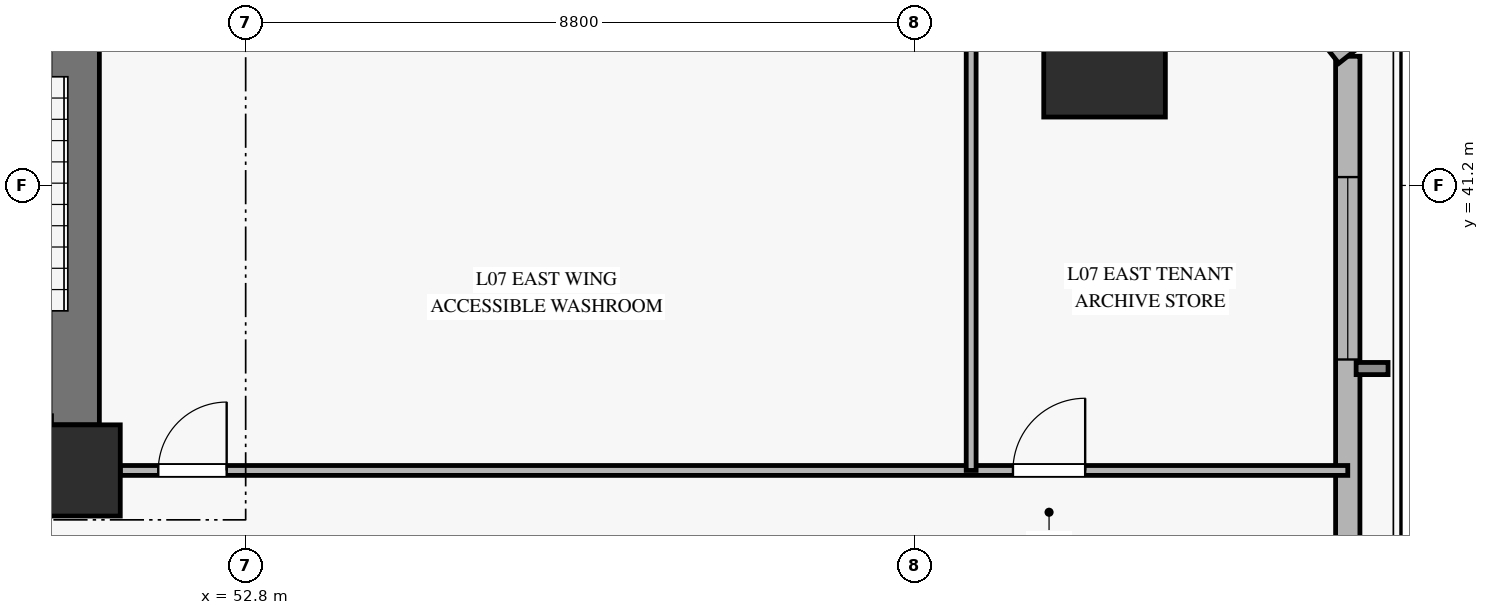
"""IFC4 building model, lengths in metres.
Left out: names, types, materials, properties, quantities, classifications, styles, units other than length and angle.
Written with IfcOpenShell. Run it as: python <this file> out.ifc"""

import sys

from ifc_helpers import new_model, si_unit, direction, frame, frame_2d, origin, origin_2d, place, context, subcontext, project, spatial, rectangle, hollow_rectangle, extrude, source, transform, mapped, element, fill, save


model = new_model("IFC4")
c1 = context("Model", 3, precision=1e-05, world=origin(), true_north=direction((0.0, 1.0)))
c2 = subcontext(c1, "Body", "Model", "MODEL_VIEW")
j1 = project(units=[si_unit("LENGTHUNIT", "METRE"), si_unit("PLANEANGLEUNIT", "RADIAN")], contexts=[c1])
p1 = place(None, origin())
s1 = spatial("IfcSite", under=j1, at=p1, CompositionType="ELEMENT")
p2 = place(p1, origin())
s2 = spatial("IfcBuilding", under=s1, at=p2, CompositionType="ELEMENT")
p3 = place(p2, frame((0.0, 0.0, 29.3)))
s3 = spatial("IfcBuildingStorey", under=s2, at=p3, CompositionType="ELEMENT", Elevation=29.3)
m1 = source(origin(), c2, "Body", "SweptSolid", [
    extrude(rectangle(XDim=1.2, YDim=1.2, at=origin_2d()), origin(), (0.0, 0.0, 1.0), 3.68),
])
p4 = place(p3, frame((50.55, 37.45, 0.0), z_axis=(0.0, 0.0, 1.0), x_axis=(1.0, 0.0, 0.0)))
e1 = element("IfcColumn", 1, at=p4, inside=s3, PredefinedType="PILASTER", context=c2, shape_type="MappedRepresentation", body=[
    mapped(m1, transform((0.0, 0.0, 0.0), x_axis=(1.0, 0.0, 0.0), y_axis=(0.0, 1.0, 0.0), z_axis=(0.0, 0.0, 1.0), scale=1.0)),
])
p5 = place(p3, frame((50.55, 38.05, 0.0), z_axis=(0.0, 0.0, 1.0), x_axis=(0.0, 1.0, 0.0)))
e2 = element("IfcWall", 2, at=p5, inside=s3, PredefinedType="SHEAR", context=c2, shape_type="SweptSolid", body=[
    extrude(rectangle(XDim=7.9, YDim=0.65, at=frame_2d((3.95, 0.0))), origin(), (0.0, 0.0, 1.0), 3.68),
])
m2 = source(origin(), c2, "Body", "SweptSolid", [
    extrude(hollow_rectangle(XDim=1.6, YDim=1.6, WallThickness=0.075, at=origin_2d()), origin(), (0.0, 0.0, 1.0), 3.68),
])
p6 = place(p3, frame((64.1, 42.9, 0.0), z_axis=(0.0, 0.0, 1.0), x_axis=(1.0, 0.0, 0.0)))
e3 = element("IfcColumn", 3, at=p6, inside=s3, PredefinedType="COLUMN", context=c2, shape_type="MappedRepresentation", body=[
    mapped(m2, transform((0.0, 0.0, 0.0), x_axis=(1.0, 0.0, 0.0), y_axis=(0.0, 1.0, 0.0), z_axis=(0.0, 0.0, 1.0), scale=1.0)),
])
p7 = place(p3, frame((67.3, 25.25, 0.0), z_axis=(0.0, 0.0, 1.0), x_axis=(0.0, 1.0, 0.0)))
e4 = element("IfcWall", 4, at=p7, inside=s3, PredefinedType="SOLIDWALL", context=c2, shape_type="SweptSolid", body=[
    extrude(rectangle(XDim=17.65, YDim=0.32, at=frame_2d((8.825, 0.0))), origin(), (0.0, 0.0, 1.0), 3.16),
])
p8 = place(p7, frame((1.446, 0.0, 0.45)))
e5 = element("IfcOpeningElement", 5, at=p8, cuts=e4, PredefinedType="OPENING", context=c2, shape_type="SweptSolid", body=[
    extrude(rectangle(XDim=2.4, YDim=2.1, at=frame_2d((1.2, 1.05))), frame((0.0, 0.17, 0.0), z_axis=(0.0, -1.0, 0.0), x_axis=(1.0, 0.0, 0.0)), (0.0, 0.0, 1.0), 0.34),
])
p9 = place(p7, frame((13.66, 0.0, 0.45)))
e6 = element("IfcOpeningElement", 6, at=p9, cuts=e4, PredefinedType="OPENING", context=c2, shape_type="SweptSolid", body=[
    extrude(rectangle(XDim=2.4, YDim=2.1, at=frame_2d((1.2, 1.05))), frame((0.0, 0.17, 0.0), z_axis=(0.0, -1.0, 0.0), x_axis=(1.0, 0.0, 0.0)), (0.0, 0.0, 1.0), 0.34),
])
p10 = place(p3, frame((67.3, 42.9, 0.0), z_axis=(0.0, 0.0, 1.0), x_axis=(-0.620413042185, 0.784275243194, 0.0)))
e7 = element("IfcWall", 7, at=p10, inside=s3, PredefinedType="SOLIDWALL", context=c2, shape_type="SweptSolid", body=[
    extrude(rectangle(XDim=4.271, YDim=0.3, at=frame_2d((2.136, 0.0))), origin(), (0.0, 0.0, 1.0), 3.16),
])
p11 = place(p10, frame((1.336, 0.0, 0.45)))
e8 = element("IfcOpeningElement", 8, at=p11, cuts=e7, PredefinedType="OPENING", context=c2, shape_type="SweptSolid", body=[
    extrude(rectangle(XDim=1.6, YDim=2.0, at=frame_2d((0.8, 1.0))), frame((0.0, 0.16, 0.0), z_axis=(0.0, -1.0, 0.0), x_axis=(1.0, 0.0, 0.0)), (0.0, 0.0, 1.0), 0.32),
])
p12 = place(p3, frame((51.15, 37.45, 0.0), z_axis=(0.0, 0.0, 1.0), x_axis=(1.0, 0.0, 0.0)))
e9 = element("IfcWall", 9, at=p12, inside=s3, PredefinedType="PARTITIONING", context=c2, shape_type="SweptSolid", body=[
    extrude(rectangle(XDim=16.15, YDim=0.13, at=frame_2d((8.075, 0.0))), origin(), (0.0, 0.0, 1.0), 3.165),
])
p13 = place(p12, frame((0.5, 0.0, 0.0)))
e10 = element("IfcOpeningElement", 10, at=p13, cuts=e9, PredefinedType="OPENING", context=c2, shape_type="SweptSolid", body=[
    extrude(rectangle(XDim=0.9, YDim=2.1, at=frame_2d((0.45, 1.05))), frame((0.0, 0.075, 0.0), z_axis=(0.0, -1.0, 0.0), x_axis=(1.0, 0.0, 0.0)), (0.0, 0.0, 1.0), 0.15),
])
p14 = place(p12, frame((11.745, 0.0, 0.0)))
e11 = element("IfcOpeningElement", 11, at=p14, cuts=e9, PredefinedType="OPENING", context=c2, shape_type="SweptSolid", body=[
    extrude(rectangle(XDim=0.95, YDim=2.1, at=frame_2d((0.475, 1.05))), frame((0.0, 0.075, 0.0), z_axis=(0.0, -1.0, 0.0), x_axis=(1.0, 0.0, 0.0)), (0.0, 0.0, 1.0), 0.15),
])
p15 = place(p3, frame((62.345, 37.45, 0.0), z_axis=(0.0, 0.0, 1.0), x_axis=(0.0, 1.0, 0.0)))
e12 = element("IfcWall", 12, at=p15, inside=s3, PredefinedType="PARTITIONING", context=c2, shape_type="SweptSolid", body=[
    extrude(rectangle(XDim=8.8, YDim=0.13, at=frame_2d((4.4, 0.0))), origin(), (0.0, 0.0, 1.0), 3.68),
])
m3 = source(origin(), c2, "Body", "SweptSolid", [
    extrude(rectangle(XDim=2.4, YDim=2.1, at=frame_2d((1.2, 1.05))), frame((0.0, 0.03, 0.0), z_axis=(0.0, -1.0, 0.0), x_axis=(1.0, 0.0, 0.0)), (0.0, 0.0, 1.0), 0.06),
])
p16 = place(p9, origin())
e13 = element("IfcWindow", 13, at=p16, inside=s3, PartitioningType="SINGLE_PANEL", PredefinedType="WINDOW", context=c2, shape_type="MappedRepresentation", body=[
    mapped(m3, transform((0.0, 0.0, 0.0), x_axis=(1.0, 0.0, 0.0), y_axis=(0.0, 1.0, 0.0), z_axis=(0.0, 0.0, 1.0), scale=1.0)),
])
fill(e6, e13)
m4 = source(origin(), c2, "Body", "SweptSolid", [
    extrude(rectangle(XDim=0.9, YDim=2.1, at=frame_2d((0.45, 1.05))), frame((0.0, 0.025, 0.0), z_axis=(0.0, -1.0, 0.0), x_axis=(1.0, 0.0, 0.0)), (0.0, 0.0, 1.0), 0.05),
])
p17 = place(p13, origin())
e14 = element("IfcDoor", 14, at=p17, inside=s3, OperationType="SINGLE_SWING_RIGHT", PredefinedType="DOOR", context=c2, shape_type="MappedRepresentation", body=[
    mapped(m4, transform((0.0, 0.0, 0.0), x_axis=(1.0, 0.0, 0.0), y_axis=(0.0, 1.0, 0.0), z_axis=(0.0, 0.0, 1.0), scale=1.0)),
])
fill(e10, e14)
m5 = source(origin(), c2, "Body", "SweptSolid", [
    extrude(rectangle(XDim=0.95, YDim=2.1, at=frame_2d((0.475, 1.05))), frame((0.0, 0.025, 0.0), z_axis=(0.0, -1.0, 0.0), x_axis=(1.0, 0.0, 0.0)), (0.0, 0.0, 1.0), 0.05),
])
p18 = place(p14, origin())
e15 = element("IfcDoor", 15, at=p18, inside=s3, OperationType="SINGLE_SWING_RIGHT", PredefinedType="DOOR", context=c2, shape_type="MappedRepresentation", body=[
    mapped(m5, transform((0.0, 0.0, 0.0), x_axis=(1.0, 0.0, 0.0), y_axis=(0.0, 1.0, 0.0), z_axis=(0.0, 0.0, 1.0), scale=1.0)),
])
fill(e11, e15)
save(model, sys.argv[1])
